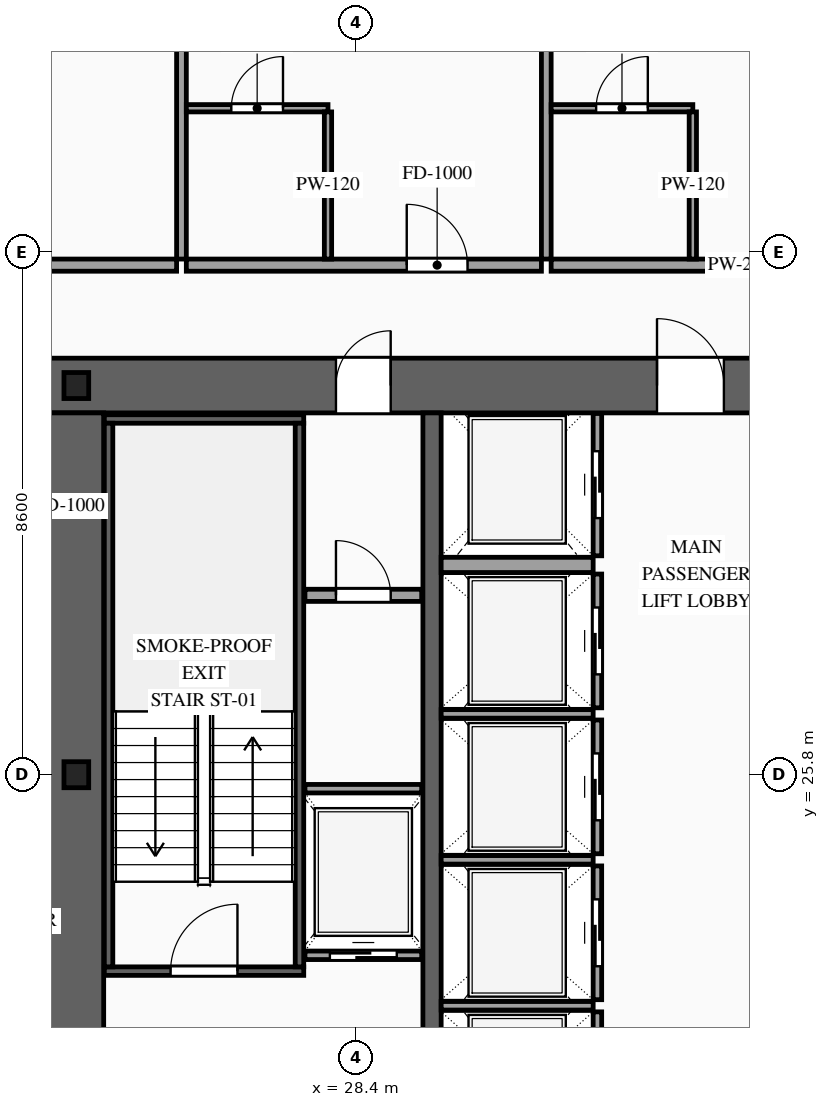
"""IFC4 building model, lengths in metres.
Left out: names, types, materials, properties, quantities, classifications, styles, units other than length and angle.
Written with IfcOpenShell. Run it as: python <this file> out.ifc"""

import sys

from ifc_helpers import new_model, si_unit, direction, frame, frame_2d, origin, origin_2d, place, context, subcontext, project, spatial, rectangle, i_section, extrude, source, transform, mapped, element, fill, save


model = new_model("IFC4")
c1 = context("Model", 3, precision=1e-05, world=origin(), true_north=direction((0.0, 1.0)))
c2 = subcontext(c1, "Body", "Model", "MODEL_VIEW")
j1 = project(units=[si_unit("LENGTHUNIT", "METRE"), si_unit("PLANEANGLEUNIT", "RADIAN")], contexts=[c1])
p1 = place(None, origin())
s1 = spatial("IfcSite", under=j1, at=p1, CompositionType="ELEMENT")
p2 = place(p1, origin())
s2 = spatial("IfcBuilding", under=s1, at=p2, CompositionType="ELEMENT")
p3 = place(p2, frame((0.0, 0.0, 78.4)))
s3 = spatial("IfcBuildingStorey", under=s2, at=p3, CompositionType="ELEMENT", Elevation=78.4)
p4 = place(p3, frame((23.35, 32.2, 0.0), z_axis=(0.0, 0.0, 1.0), x_axis=(1.0, 0.0, 0.0)))
e1 = element("IfcWall", 1, at=p4, inside=s3, PredefinedType="SHEAR", context=c2, shape_type="SweptSolid", body=[
    extrude(rectangle(XDim=27.3, YDim=0.9, at=frame_2d((13.65, 0.0))), origin(), (0.0, 0.0, 1.0), 3.6),
])
p5 = place(p4, frame((4.72, 0.0, 0.0)))
e2 = element("IfcOpeningElement", 2, at=p5, cuts=e1, PredefinedType="OPENING", context=c2, shape_type="SweptSolid", body=[
    extrude(rectangle(XDim=0.9, YDim=2.15, at=frame_2d((0.45, 1.075))), frame((0.0, 0.465, 0.0), z_axis=(0.0, -1.0, 0.0), x_axis=(1.0, 0.0, 0.0)), (0.0, 0.0, 1.0), 0.93),
])
p6 = place(p4, frame((10.0, 0.0, 0.0)))
e3 = element("IfcOpeningElement", 3, at=p6, cuts=e1, PredefinedType="OPENING", context=c2, shape_type="SweptSolid", body=[
    extrude(rectangle(XDim=1.1, YDim=2.2, at=frame_2d((0.55, 1.1))), frame((0.0, 0.465, 0.0), z_axis=(0.0, -1.0, 0.0), x_axis=(1.0, 0.0, 0.0)), (0.0, 0.0, 1.0), 0.93),
])
p7 = place(p4, frame((15.85, 0.0, 0.0)))
e4 = element("IfcOpeningElement", 4, at=p7, cuts=e1, PredefinedType="OPENING", context=c2, shape_type="SweptSolid", body=[
    extrude(rectangle(XDim=1.1, YDim=2.2, at=frame_2d((0.55, 1.1))), frame((0.0, 0.465, 0.0), z_axis=(0.0, -1.0, 0.0), x_axis=(1.0, 0.0, 0.0)), (0.0, 0.0, 1.0), 0.93),
])
m1 = source(origin(), c2, "Body", "SweptSolid", [
    extrude(rectangle(XDim=11.9, YDim=0.9, at=frame_2d((5.95, 0.0))), origin(), (0.0, 0.0, 1.0), 3.6),
])
p8 = place(p3, frame((23.8, 19.85, 0.0), z_axis=(0.0, 0.0, 1.0), x_axis=(0.0, 1.0, 0.0)))
e5 = element("IfcWall", 5, at=p8, inside=s3, PredefinedType="SHEAR", context=c2, shape_type="MappedRepresentation", body=[
    mapped(m1, transform((0.0, 0.0, 0.0), scale=1.0)),
])
m2 = source(origin(), c2, "Body", "SweptSolid", [
    extrude(rectangle(XDim=11.9, YDim=0.3, at=frame_2d((5.95, 0.0))), origin(), (0.0, 0.0, 1.0), 3.6),
])
p9 = place(p3, frame((29.65, 19.85, 0.0), z_axis=(0.0, 0.0, 1.0), x_axis=(0.0, 1.0, 0.0)))
e6 = element("IfcWall", 6, at=p9, inside=s3, PredefinedType="SOLIDWALL", context=c2, shape_type="MappedRepresentation", body=[
    mapped(m2, transform((0.0, 0.0, 0.0), scale=1.0)),
])
m3 = source(origin(), c2, "Body", "SweptSolid", [
    extrude(i_section(OverallWidth=0.407, OverallDepth=0.428, WebThickness=0.02, FlangeThickness=0.035, at=origin_2d()), origin(), (0.0, 0.0, 1.0), 3.6),
])
for number, where, z_axis, x_axis in (
    (7, (23.8, 25.8, 0.0), (0.0, 0.0, 1.0), (1.0, 0.0, 0.0)),
    (8, (23.8, 32.2, 0.0), (0.0, 0.0, 1.0), (1.0, 0.0, 0.0)),
):
    element("IfcColumn", number, at=place(p3, frame(where, z_axis=z_axis, x_axis=x_axis)), inside=s3, PredefinedType="COLUMN", context=c2, shape_type="MappedRepresentation", body=[
        mapped(m3, transform((0.0, 0.0, 0.0), scale=1.0)),
    ])
p10 = place(p3, frame((27.56, 22.83, 0.0), z_axis=(0.0, 0.0, 1.0), x_axis=(1.0, 0.0, 0.0)))
e9 = element("IfcWall", 9, at=p10, inside=s3, PredefinedType="SOLIDWALL", context=c2, shape_type="SweptSolid", body=[
    extrude(rectangle(XDim=1.92, YDim=0.14, at=frame_2d((0.96, 0.0))), origin(), (0.0, 0.0, 1.0), 3.38),
])
p11 = place(p10, frame((0.41, 0.0, 0.0)))
e10 = element("IfcOpeningElement", 10, at=p11, cuts=e9, PredefinedType="OPENING", context=c2, shape_type="SweptSolid", body=[
    extrude(rectangle(XDim=1.1, YDim=2.2, at=frame_2d((0.55, 1.1))), frame((0.0, 0.085, 0.0), z_axis=(0.0, -1.0, 0.0), x_axis=(1.0, 0.0, 0.0)), (0.0, 0.0, 1.0), 0.17),
])
m4 = source(origin(), c2, "Body", "SweptSolid", [
    extrude(rectangle(XDim=1.92, YDim=0.14, at=frame_2d((0.96, 0.0))), origin(), (0.0, 0.0, 1.0), 3.38),
])
p12 = place(p3, frame((27.56, 25.57, 0.0), z_axis=(0.0, 0.0, 1.0), x_axis=(1.0, 0.0, 0.0)))
e11 = element("IfcWall", 11, at=p12, inside=s3, PredefinedType="SOLIDWALL", context=c2, shape_type="MappedRepresentation", body=[
    mapped(m4, transform((0.0, 0.0, 0.0), scale=1.0)),
])
p13 = place(p3, frame((32.37, 19.86, 0.0), z_axis=(0.0, 0.0, 1.0), x_axis=(0.0, 1.0, 0.0)))
e12 = element("IfcWall", 12, at=p13, inside=s3, PredefinedType="SOLIDWALL", context=c2, shape_type="SweptSolid", body=[
    extrude(rectangle(XDim=2.04, YDim=0.14, at=frame_2d((1.02, 0.0))), origin(), (0.0, 0.0, 1.0), 3.38),
])
p14 = place(p13, frame((0.47, 0.0, 0.0)))
e13 = element("IfcOpeningElement", 13, at=p14, cuts=e12, PredefinedType="OPENING", context=c2, shape_type="SweptSolid", body=[
    extrude(rectangle(XDim=1.1, YDim=2.2, at=frame_2d((0.55, 1.1))), frame((0.0, 0.085, 0.0), z_axis=(0.0, -1.0, 0.0), x_axis=(1.0, 0.0, 0.0)), (0.0, 0.0, 1.0), 0.17),
])
m5 = source(origin(), c2, "Body", "SweptSolid", [
    extrude(rectangle(XDim=2.5, YDim=0.14, at=frame_2d((1.25, 0.0))), origin(), (0.0, 0.0, 1.0), 3.38),
])
p15 = place(p3, frame((29.8, 22.0, 0.0), z_axis=(0.0, 0.0, 1.0), x_axis=(1.0, 0.0, 0.0)))
e14 = element("IfcWall", 14, at=p15, inside=s3, PredefinedType="SOLIDWALL", context=c2, shape_type="MappedRepresentation", body=[
    mapped(m5, transform((0.0, 0.0, 0.0), scale=1.0)),
])
p16 = place(p3, frame((32.37, 22.1, 0.0), z_axis=(0.0, 0.0, 1.0), x_axis=(0.0, 1.0, 0.0)))
e15 = element("IfcWall", 15, at=p16, inside=s3, PredefinedType="SOLIDWALL", context=c2, shape_type="SweptSolid", body=[
    extrude(rectangle(XDim=2.2, YDim=0.14, at=frame_2d((1.1, 0.0))), origin(), (0.0, 0.0, 1.0), 3.38),
])
p17 = place(p16, frame((0.55, 0.0, 0.0)))
e16 = element("IfcOpeningElement", 16, at=p17, cuts=e15, PredefinedType="OPENING", context=c2, shape_type="SweptSolid", body=[
    extrude(rectangle(XDim=1.1, YDim=2.2, at=frame_2d((0.55, 1.1))), frame((0.0, 0.085, 0.0), z_axis=(0.0, -1.0, 0.0), x_axis=(1.0, 0.0, 0.0)), (0.0, 0.0, 1.0), 0.17),
])
p18 = place(p3, frame((29.8, 24.4, 0.0), z_axis=(0.0, 0.0, 1.0), x_axis=(1.0, 0.0, 0.0)))
e17 = element("IfcWall", 17, at=p18, inside=s3, PredefinedType="SOLIDWALL", context=c2, shape_type="MappedRepresentation", body=[
    mapped(m5, transform((0.0, 0.0, 0.0), scale=1.0)),
])
p19 = place(p3, frame((32.37, 24.5, 0.0), z_axis=(0.0, 0.0, 1.0), x_axis=(0.0, 1.0, 0.0)))
e18 = element("IfcWall", 18, at=p19, inside=s3, PredefinedType="SOLIDWALL", context=c2, shape_type="SweptSolid", body=[
    extrude(rectangle(XDim=2.2, YDim=0.14, at=frame_2d((1.1, 0.0))), origin(), (0.0, 0.0, 1.0), 3.38),
])
p20 = place(p19, frame((0.55, 0.0, 0.0)))
e19 = element("IfcOpeningElement", 19, at=p20, cuts=e18, PredefinedType="OPENING", context=c2, shape_type="SweptSolid", body=[
    extrude(rectangle(XDim=1.1, YDim=2.2, at=frame_2d((0.55, 1.1))), frame((0.0, 0.085, 0.0), z_axis=(0.0, -1.0, 0.0), x_axis=(1.0, 0.0, 0.0)), (0.0, 0.0, 1.0), 0.17),
])
p21 = place(p3, frame((29.8, 26.8, 0.0), z_axis=(0.0, 0.0, 1.0), x_axis=(1.0, 0.0, 0.0)))
e20 = element("IfcWall", 20, at=p21, inside=s3, PredefinedType="SOLIDWALL", context=c2, shape_type="MappedRepresentation", body=[
    mapped(m5, transform((0.0, 0.0, 0.0), scale=1.0)),
])
p22 = place(p3, frame((32.37, 26.9, 0.0), z_axis=(0.0, 0.0, 1.0), x_axis=(0.0, 1.0, 0.0)))
e21 = element("IfcWall", 21, at=p22, inside=s3, PredefinedType="SOLIDWALL", context=c2, shape_type="SweptSolid", body=[
    extrude(rectangle(XDim=2.2, YDim=0.14, at=frame_2d((1.1, 0.0))), origin(), (0.0, 0.0, 1.0), 3.38),
])
p23 = place(p22, frame((0.55, 0.0, 0.0)))
e22 = element("IfcOpeningElement", 22, at=p23, cuts=e21, PredefinedType="OPENING", context=c2, shape_type="SweptSolid", body=[
    extrude(rectangle(XDim=1.1, YDim=2.2, at=frame_2d((0.55, 1.1))), frame((0.0, 0.085, 0.0), z_axis=(0.0, -1.0, 0.0), x_axis=(1.0, 0.0, 0.0)), (0.0, 0.0, 1.0), 0.17),
])
p24 = place(p3, frame((32.37, 29.4, 0.0), z_axis=(0.0, 0.0, 1.0), x_axis=(0.0, 1.0, 0.0)))
e23 = element("IfcWall", 23, at=p24, inside=s3, PredefinedType="SOLIDWALL", context=c2, shape_type="SweptSolid", body=[
    extrude(rectangle(XDim=2.34, YDim=0.14, at=frame_2d((1.17, 0.0))), origin(), (0.0, 0.0, 1.0), 3.38),
])
p25 = place(p24, frame((0.62, 0.0, 0.0)))
e24 = element("IfcOpeningElement", 24, at=p25, cuts=e23, PredefinedType="OPENING", context=c2, shape_type="SweptSolid", body=[
    extrude(rectangle(XDim=1.1, YDim=2.2, at=frame_2d((0.55, 1.1))), frame((0.0, 0.085, 0.0), z_axis=(0.0, -1.0, 0.0), x_axis=(1.0, 0.0, 0.0)), (0.0, 0.0, 1.0), 0.17),
])
m6 = source(origin(), c2, "Body", "SweptSolid", [
    extrude(rectangle(XDim=2.5, YDim=0.25, at=frame_2d((1.25, 0.0))), origin(), (0.0, 0.0, 1.0), 3.38),
])
p26 = place(p3, frame((29.8, 29.25, 0.0), z_axis=(0.0, 0.0, 1.0), x_axis=(1.0, 0.0, 0.0)))
e25 = element("IfcWall", 25, at=p26, inside=s3, PredefinedType="SOLIDWALL", context=c2, shape_type="MappedRepresentation", body=[
    mapped(m6, transform((0.0, 0.0, 0.0), scale=1.0)),
])
p27 = place(p3, frame((24.26, 22.57, 0.0), z_axis=(0.0, 0.0, 1.0), x_axis=(1.0, 0.0, 0.0)))
e26 = element("IfcWall", 26, at=p27, inside=s3, PredefinedType="SOLIDWALL", context=c2, shape_type="SweptSolid", body=[
    extrude(rectangle(XDim=3.28, YDim=0.14, at=frame_2d((1.64, 0.0))), origin(), (0.0, 0.0, 1.0), 3.38),
])
p28 = place(p27, frame((1.09, 0.0, 0.0)))
e27 = element("IfcOpeningElement", 27, at=p28, cuts=e26, PredefinedType="OPENING", context=c2, shape_type="SweptSolid", body=[
    extrude(rectangle(XDim=1.1, YDim=2.2, at=frame_2d((0.55, 1.1))), frame((0.0, 0.085, 0.0), z_axis=(0.0, -1.0, 0.0), x_axis=(1.0, 0.0, 0.0)), (0.0, 0.0, 1.0), 0.17),
])
m7 = source(origin(), c2, "Body", "SweptSolid", [
    extrude(rectangle(XDim=3.28, YDim=0.14, at=frame_2d((1.64, 0.0))), origin(), (0.0, 0.0, 1.0), 3.38),
])
p29 = place(p3, frame((24.26, 31.65, 0.0), z_axis=(0.0, 0.0, 1.0), x_axis=(1.0, 0.0, 0.0)))
e28 = element("IfcWall", 28, at=p29, inside=s3, PredefinedType="SOLIDWALL", context=c2, shape_type="MappedRepresentation", body=[
    mapped(m7, transform((0.0, 0.0, 0.0), scale=1.0)),
])
m8 = source(origin(), c2, "Body", "SweptSolid", [
    extrude(rectangle(XDim=8.94, YDim=0.14, at=frame_2d((4.47, 0.0))), origin(), (0.0, 0.0, 1.0), 3.38),
])
for number, where, z_axis, x_axis in (
    (29, (24.33, 22.64, 0.0), (0.0, 0.0, 1.0), (0.0, 1.0, 0.0)),
    (30, (27.47, 22.64, 0.0), (0.0, 0.0, 1.0), (0.0, 1.0, 0.0)),
):
    element("IfcWall", number, at=place(p3, frame(where, z_axis=z_axis, x_axis=x_axis)), inside=s3, PredefinedType="SOLIDWALL", context=c2, shape_type="MappedRepresentation", body=[
        mapped(m8, transform((0.0, 0.0, 0.0), scale=1.0)),
    ])
p30 = place(p3, frame((27.56, 28.75, 0.0), z_axis=(0.0, 0.0, 1.0), x_axis=(1.0, 0.0, 0.0)))
e31 = element("IfcWall", 31, at=p30, inside=s3, PredefinedType="PARTITIONING", context=c2, shape_type="SweptSolid", body=[
    extrude(rectangle(XDim=1.92, YDim=0.2, at=frame_2d((0.96, 0.0))), origin(), (0.0, 0.0, 1.0), 3.38),
])
p31 = place(p30, frame((0.51, 0.0, 0.0)))
e32 = element("IfcOpeningElement", 32, at=p31, cuts=e31, PredefinedType="OPENING", context=c2, shape_type="SweptSolid", body=[
    extrude(rectangle(XDim=0.9, YDim=2.15, at=frame_2d((0.45, 1.075))), frame((0.0, 0.115, 0.0), z_axis=(0.0, -1.0, 0.0), x_axis=(1.0, 0.0, 0.0)), (0.0, 0.0, 1.0), 0.23),
])
p32 = place(p3, frame((14.94, 34.18, 0.0), z_axis=(0.0, 0.0, 1.0), x_axis=(1.0, 0.0, 0.0)))
e33 = element("IfcWall", 33, at=p32, inside=s3, PredefinedType="PARTITIONING", context=c2, shape_type="SweptSolid", body=[
    extrude(rectangle(XDim=10.509, YDim=0.2, at=frame_2d((5.254, 0.0))), origin(), (0.0, 0.0, 1.0), 3.38),
])
p33 = place(p32, frame((5.959, 0.0, 0.0)))
e34 = element("IfcOpeningElement", 34, at=p33, cuts=e33, PredefinedType="OPENING", context=c2, shape_type="SweptSolid", body=[
    extrude(rectangle(XDim=1.0, YDim=2.2, at=frame_2d((0.5, 1.1))), frame((0.0, 0.115, 0.0), z_axis=(0.0, -1.0, 0.0), x_axis=(1.0, 0.0, 0.0)), (0.0, 0.0, 1.0), 0.23),
])
m9 = source(origin(), c2, "Body", "SweptSolid", [
    extrude(rectangle(XDim=16.47, YDim=0.16, at=frame_2d((8.235, 0.0))), origin(), (0.0, 0.0, 1.0), 3.38),
])
p34 = place(p3, frame((25.529, 34.28, 0.0), z_axis=(0.0, 0.0, 1.0), x_axis=(0.0, 1.0, 0.0)))
e35 = element("IfcWall", 35, at=p34, inside=s3, PredefinedType="PARTITIONING", context=c2, shape_type="MappedRepresentation", body=[
    mapped(m9, transform((0.0, 0.0, 0.0), scale=1.0)),
])
p35 = place(p3, frame((25.609, 34.18, 0.0), z_axis=(0.0, 0.0, 1.0), x_axis=(1.0, 0.0, 0.0)))
e36 = element("IfcWall", 36, at=p35, inside=s3, PredefinedType="PARTITIONING", context=c2, shape_type="SweptSolid", body=[
    extrude(rectangle(XDim=5.84, YDim=0.2, at=frame_2d((2.92, 0.0))), origin(), (0.0, 0.0, 1.0), 3.38),
])
p36 = place(p35, frame((3.625, 0.0, 0.0)))
e37 = element("IfcOpeningElement", 37, at=p36, cuts=e36, PredefinedType="OPENING", context=c2, shape_type="SweptSolid", body=[
    extrude(rectangle(XDim=1.0, YDim=2.2, at=frame_2d((0.5, 1.1))), frame((0.0, 0.115, 0.0), z_axis=(0.0, -1.0, 0.0), x_axis=(1.0, 0.0, 0.0)), (0.0, 0.0, 1.0), 0.23),
])
p37 = place(p3, frame((31.529, 34.28, 0.0), z_axis=(0.0, 0.0, 1.0), x_axis=(0.0, 1.0, 0.0)))
e38 = element("IfcWall", 38, at=p37, inside=s3, PredefinedType="PARTITIONING", context=c2, shape_type="MappedRepresentation", body=[
    mapped(m9, transform((0.0, 0.0, 0.0), scale=1.0)),
])
p38 = place(p3, frame((25.609, 36.76, 0.0), z_axis=(0.0, 0.0, 1.0), x_axis=(1.0, 0.0, 0.0)))
e39 = element("IfcWall", 39, at=p38, inside=s3, PredefinedType="PARTITIONING", context=c2, shape_type="SweptSolid", body=[
    extrude(rectangle(XDim=2.33, YDim=0.12, at=frame_2d((1.165, 0.0))), origin(), (0.0, 0.0, 1.0), 3.38),
])
p39 = place(p38, frame((0.74, 0.0, 0.0)))
e40 = element("IfcOpeningElement", 40, at=p39, cuts=e39, PredefinedType="OPENING", context=c2, shape_type="SweptSolid", body=[
    extrude(rectangle(XDim=0.85, YDim=2.1, at=frame_2d((0.425, 1.05))), frame((0.0, 0.075, 0.0), z_axis=(0.0, -1.0, 0.0), x_axis=(1.0, 0.0, 0.0)), (0.0, 0.0, 1.0), 0.15),
])
m10 = source(origin(), c2, "Body", "SweptSolid", [
    extrude(rectangle(XDim=2.42, YDim=0.12, at=frame_2d((1.21, 0.0))), origin(), (0.0, 0.0, 1.0), 3.38),
])
p40 = place(p3, frame((27.939, 34.28, 0.0), z_axis=(0.0, 0.0, 1.0), x_axis=(0.0, 1.0, 0.0)))
e41 = element("IfcWall", 41, at=p40, inside=s3, PredefinedType="PARTITIONING", context=c2, shape_type="MappedRepresentation", body=[
    mapped(m10, transform((0.0, 0.0, 0.0), scale=1.0)),
])
p41 = place(p3, frame((31.609, 34.18, 0.0), z_axis=(0.0, 0.0, 1.0), x_axis=(1.0, 0.0, 0.0)))
e42 = element("IfcWall", 42, at=p41, inside=s3, PredefinedType="PARTITIONING", context=c2, shape_type="SweptSolid", body=[
    extrude(rectangle(XDim=11.488, YDim=0.2, at=frame_2d((5.744, 0.0))), origin(), (0.0, 0.0, 1.0), 3.38),
])
p42 = place(p41, frame((6.449, 0.0, 0.0)))
e43 = element("IfcOpeningElement", 43, at=p42, cuts=e42, PredefinedType="OPENING", context=c2, shape_type="SweptSolid", body=[
    extrude(rectangle(XDim=1.0, YDim=2.2, at=frame_2d((0.5, 1.1))), frame((0.0, 0.115, 0.0), z_axis=(0.0, -1.0, 0.0), x_axis=(1.0, 0.0, 0.0)), (0.0, 0.0, 1.0), 0.23),
])
p43 = place(p3, frame((31.609, 36.76, 0.0), z_axis=(0.0, 0.0, 1.0), x_axis=(1.0, 0.0, 0.0)))
e44 = element("IfcWall", 44, at=p43, inside=s3, PredefinedType="PARTITIONING", context=c2, shape_type="SweptSolid", body=[
    extrude(rectangle(XDim=2.33, YDim=0.12, at=frame_2d((1.165, 0.0))), origin(), (0.0, 0.0, 1.0), 3.38),
])
p44 = place(p43, frame((0.74, 0.0, 0.0)))
e45 = element("IfcOpeningElement", 45, at=p44, cuts=e44, PredefinedType="OPENING", context=c2, shape_type="SweptSolid", body=[
    extrude(rectangle(XDim=0.85, YDim=2.1, at=frame_2d((0.425, 1.05))), frame((0.0, 0.075, 0.0), z_axis=(0.0, -1.0, 0.0), x_axis=(1.0, 0.0, 0.0)), (0.0, 0.0, 1.0), 0.15),
])
p45 = place(p3, frame((33.939, 34.28, 0.0), z_axis=(0.0, 0.0, 1.0), x_axis=(0.0, 1.0, 0.0)))
e46 = element("IfcWall", 46, at=p45, inside=s3, PredefinedType="PARTITIONING", context=c2, shape_type="MappedRepresentation", body=[
    mapped(m10, transform((0.0, 0.0, 0.0), scale=1.0)),
])
m11 = source(origin(), c2, "Body", "SweptSolid", [
    extrude(rectangle(XDim=1.1, YDim=2.2, at=frame_2d((0.55, 1.1))), frame((0.0, 0.025, 0.0), z_axis=(0.0, -1.0, 0.0), x_axis=(1.0, 0.0, 0.0)), (0.0, 0.0, 1.0), 0.05),
])
p46 = place(p11, origin())
e47 = element("IfcDoor", 47, at=p46, inside=s3, OperationType="SLIDING_TO_LEFT", PredefinedType="DOOR", context=c2, shape_type="MappedRepresentation", body=[
    mapped(m11, transform((0.0, 0.0, 0.0), scale=1.0)),
])
fill(e10, e47)
p47 = place(p17, origin())
e48 = element("IfcDoor", 48, at=p47, inside=s3, OperationType="SLIDING_TO_RIGHT", PredefinedType="DOOR", context=c2, shape_type="MappedRepresentation", body=[
    mapped(m11, transform((0.0, 0.0, 0.0), scale=1.0)),
])
fill(e16, e48)
p48 = place(p20, origin())
e49 = element("IfcDoor", 49, at=p48, inside=s3, OperationType="SLIDING_TO_LEFT", PredefinedType="DOOR", context=c2, shape_type="MappedRepresentation", body=[
    mapped(m11, transform((0.0, 0.0, 0.0), scale=1.0)),
])
fill(e19, e49)
p49 = place(p23, origin())
e50 = element("IfcDoor", 50, at=p49, inside=s3, OperationType="SLIDING_TO_RIGHT", PredefinedType="DOOR", context=c2, shape_type="MappedRepresentation", body=[
    mapped(m11, transform((0.0, 0.0, 0.0), scale=1.0)),
])
fill(e22, e50)
p50 = place(p25, origin())
e51 = element("IfcDoor", 51, at=p50, inside=s3, OperationType="SLIDING_TO_LEFT", PredefinedType="DOOR", context=c2, shape_type="MappedRepresentation", body=[
    mapped(m11, transform((0.0, 0.0, 0.0), scale=1.0)),
])
fill(e24, e51)
m12 = source(origin(), c2, "Body", "SweptSolid", [
    extrude(rectangle(XDim=1.1, YDim=2.2, at=frame_2d((0.55, 1.1))), frame((0.0, 0.025, 0.0), z_axis=(0.0, -1.0, 0.0), x_axis=(1.0, 0.0, 0.0)), (0.0, 0.0, 1.0), 0.05),
])
p51 = place(p28, origin())
e52 = element("IfcDoor", 52, at=p51, inside=s3, OperationType="SINGLE_SWING_RIGHT", PredefinedType="DOOR", context=c2, shape_type="MappedRepresentation", body=[
    mapped(m12, transform((0.0, 0.0, 0.0), scale=1.0)),
])
fill(e27, e52)
m13 = source(origin(), c2, "Body", "SweptSolid", [
    extrude(rectangle(XDim=0.9, YDim=2.15, at=frame_2d((0.45, 1.075))), frame((0.0, 0.025, 0.0), z_axis=(0.0, -1.0, 0.0), x_axis=(1.0, 0.0, 0.0)), (0.0, 0.0, 1.0), 0.05),
])
p52 = place(p5, origin())
e53 = element("IfcDoor", 53, at=p52, inside=s3, OperationType="SINGLE_SWING_RIGHT", PredefinedType="DOOR", context=c2, shape_type="MappedRepresentation", body=[
    mapped(m13, transform((0.0, 0.0, 0.0), scale=1.0)),
])
fill(e2, e53)
p53 = place(p6, origin())
e54 = element("IfcDoor", 54, at=p53, inside=s3, OperationType="SINGLE_SWING_LEFT", PredefinedType="DOOR", context=c2, shape_type="MappedRepresentation", body=[
    mapped(m12, transform((0.0, 0.0, 0.0), scale=1.0)),
])
fill(e3, e54)
p54 = place(p31, origin())
e55 = element("IfcDoor", 55, at=p54, inside=s3, OperationType="SINGLE_SWING_LEFT", PredefinedType="DOOR", context=c2, shape_type="MappedRepresentation", body=[
    mapped(m13, transform((0.0, 0.0, 0.0), scale=1.0)),
])
fill(e32, e55)
m14 = source(origin(), c2, "Body", "SweptSolid", [
    extrude(rectangle(XDim=1.0, YDim=2.2, at=frame_2d((0.5, 1.1))), frame((0.0, 0.025, 0.0), z_axis=(0.0, -1.0, 0.0), x_axis=(1.0, 0.0, 0.0)), (0.0, 0.0, 1.0), 0.05),
])
p55 = place(p36, origin())
e56 = element("IfcDoor", 56, at=p55, inside=s3, OperationType="SINGLE_SWING_LEFT", PredefinedType="DOOR", context=c2, shape_type="MappedRepresentation", body=[
    mapped(m14, transform((0.0, 0.0, 0.0), scale=1.0)),
])
fill(e37, e56)
m15 = source(origin(), c2, "Body", "SweptSolid", [
    extrude(rectangle(XDim=0.85, YDim=2.1, at=frame_2d((0.425, 1.05))), frame((0.0, 0.025, 0.0), z_axis=(0.0, -1.0, 0.0), x_axis=(1.0, 0.0, 0.0)), (0.0, 0.0, 1.0), 0.05),
])
p56 = place(p39, origin())
e57 = element("IfcDoor", 57, at=p56, inside=s3, OperationType="SINGLE_SWING_RIGHT", PredefinedType="DOOR", context=c2, shape_type="MappedRepresentation", body=[
    mapped(m15, transform((0.0, 0.0, 0.0), scale=1.0)),
])
fill(e40, e57)
p57 = place(p44, origin())
e58 = element("IfcDoor", 58, at=p57, inside=s3, OperationType="SINGLE_SWING_RIGHT", PredefinedType="DOOR", context=c2, shape_type="MappedRepresentation", body=[
    mapped(m15, transform((0.0, 0.0, 0.0), scale=1.0)),
])
fill(e45, e58)
save(model, sys.argv[1])
